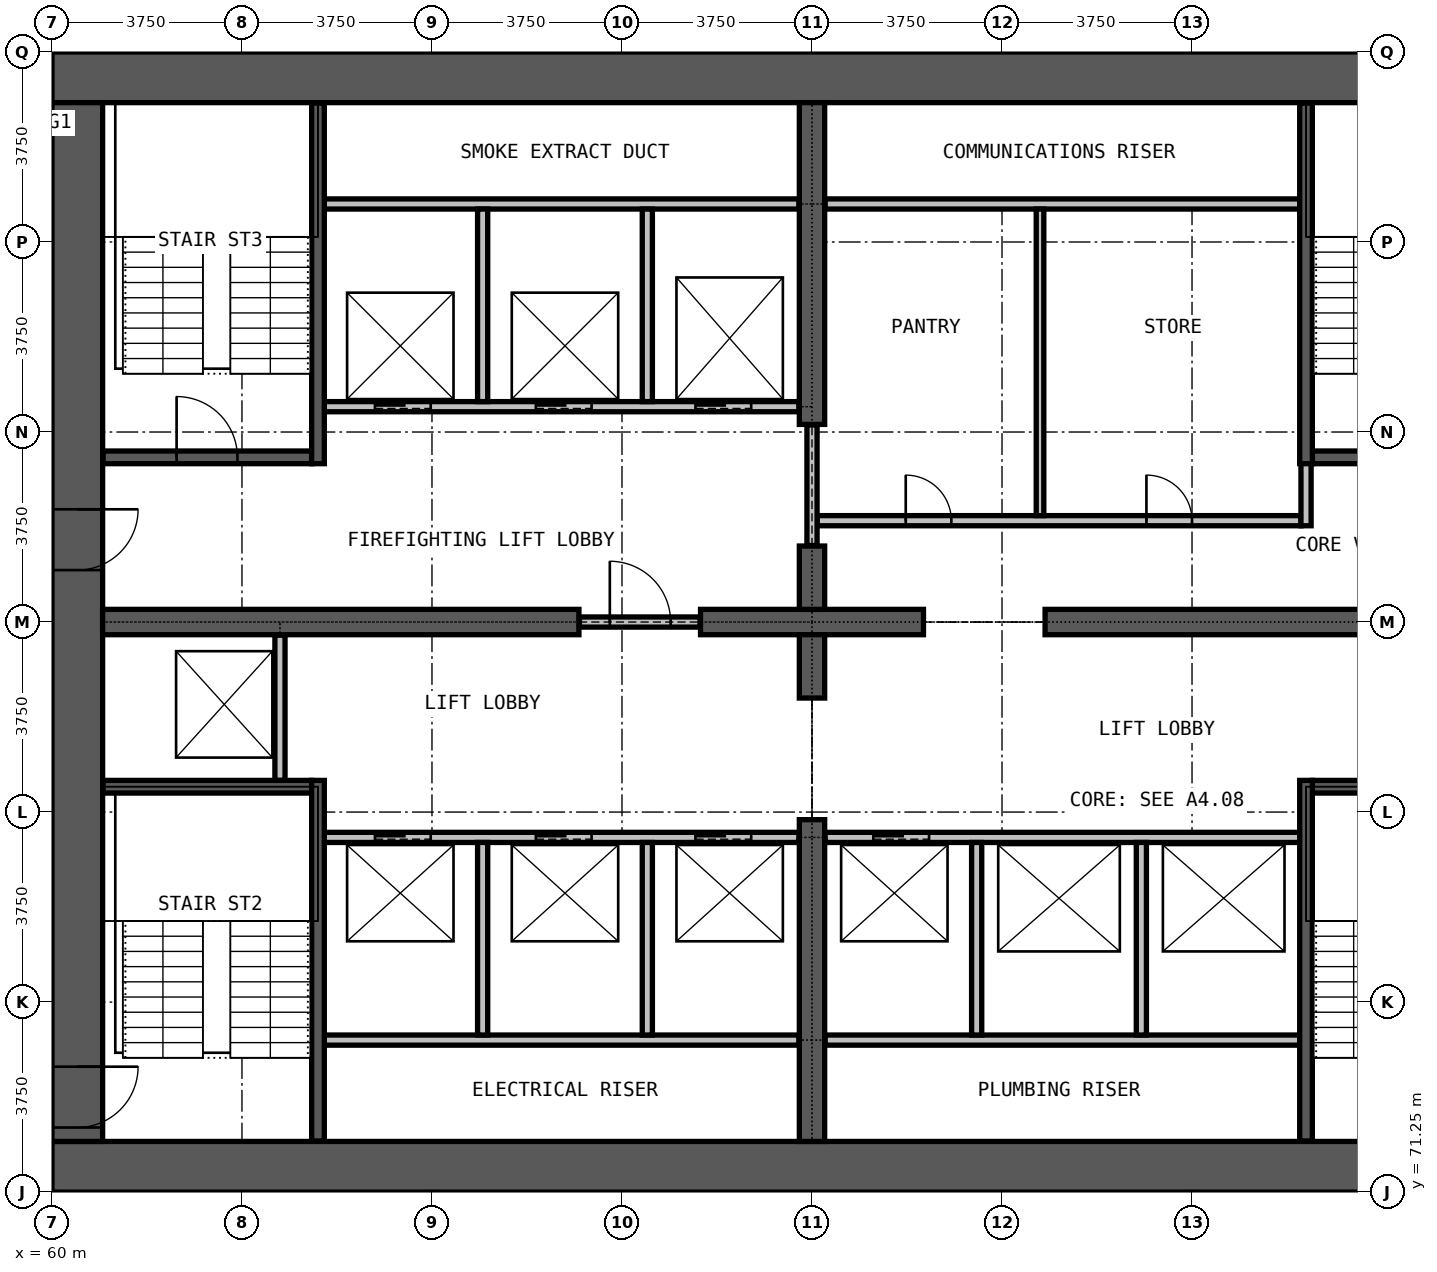
"""IFC4 building model, lengths in metres.
Left out: names, types, materials, properties, quantities, classifications, styles, units other than length and angle.
Written with IfcOpenShell. Run it as: python <this file> out.ifc"""

import sys

from ifc_helpers import new_model, si_unit, direction, frame, frame_2d, origin, place, context, subcontext, project, spatial, rectangle, extrude, element, fill, save


model = new_model("IFC4")
c1 = context("Model", 3, precision=1e-05, world=origin(), true_north=direction((0.0, 1.0)))
c2 = subcontext(c1, "Body", "Model", "MODEL_VIEW")
j1 = project(units=[si_unit("LENGTHUNIT", "METRE"), si_unit("PLANEANGLEUNIT", "RADIAN")], contexts=[c1])
p1 = place(None, origin())
s1 = spatial("IfcSite", under=j1, at=p1, CompositionType="ELEMENT")
p2 = place(p1, origin())
s2 = spatial("IfcBuilding", under=s1, at=p2, CompositionType="ELEMENT")
p3 = place(p2, frame((0.0, 0.0, 52.7)))
s3 = spatial("IfcBuildingStorey", under=s2, at=p3, CompositionType="ELEMENT", Elevation=52.7)
for number, where, z_axis, x_axis in (
    (1, (60.0, 71.75, 0.0), (0.0, 0.0, 1.0), (1.0, 0.0, 0.0)),
    (2, (90.0, 93.25, 0.0), (0.0, 0.0, 1.0), (-1.0, 0.0, 0.0)),
):
    element("IfcWall", number, at=place(p3, frame(where, z_axis=z_axis, x_axis=x_axis)), inside=s3, PredefinedType="SHEAR", context=c2, shape_type="SweptSolid", body=[
        extrude(rectangle(XDim=30.0, YDim=1.0, at=frame_2d((15.0, 0.0))), origin(), (0.0, 0.0, 1.0), 3.3),
    ])
p4 = place(p3, frame((60.5, 92.75, 0.0), z_axis=(0.0, 0.0, 1.0), x_axis=(0.0, -1.0, 0.0)))
e3 = element("IfcWall", 3, at=p4, inside=s3, PredefinedType="SHEAR", context=c2, shape_type="SweptSolid", body=[
    extrude(rectangle(XDim=20.5, YDim=1.0, at=frame_2d((10.25, 0.0))), origin(), (0.0, 0.0, 1.0), 3.3),
])
p5 = place(p4, frame((19.025, 0.0, 0.0)))
e4 = element("IfcOpeningElement", 4, at=p5, cuts=e3, PredefinedType="OPENING", context=c2, shape_type="SweptSolid", body=[
    extrude(rectangle(XDim=1.2, YDim=2.2, at=frame_2d((0.6, 1.1))), frame((0.0, 0.51, 0.0), z_axis=(0.0, -1.0, 0.0), x_axis=(1.0, 0.0, 0.0)), (0.0, 0.0, 1.0), 1.02),
])
p6 = place(p4, frame((8.025, 0.0, 0.0)))
e5 = element("IfcOpeningElement", 5, at=p6, cuts=e3, PredefinedType="OPENING", context=c2, shape_type="SweptSolid", body=[
    extrude(rectangle(XDim=1.2, YDim=2.2, at=frame_2d((0.6, 1.1))), frame((0.0, 0.51, 0.0), z_axis=(0.0, -1.0, 0.0), x_axis=(1.0, 0.0, 0.0)), (0.0, 0.0, 1.0), 1.02),
])
p7 = place(p3, frame((61.0, 82.5, 0.0), z_axis=(0.0, 0.0, 1.0), x_axis=(1.0, 0.0, 0.0)))
e6 = element("IfcWall", 6, at=p7, inside=s3, PredefinedType="SHEAR", context=c2, shape_type="SweptSolid", body=[
    extrude(rectangle(XDim=9.4, YDim=0.5, at=frame_2d((4.7, 0.0))), origin(), (0.0, 0.0, 1.0), 3.3),
])
p8 = place(p3, frame((72.8, 82.5, 0.0), z_axis=(0.0, 0.0, 1.0), x_axis=(1.0, 0.0, 0.0)))
e7 = element("IfcWall", 7, at=p8, inside=s3, PredefinedType="SHEAR", context=c2, shape_type="SweptSolid", body=[
    extrude(rectangle(XDim=4.4, YDim=0.5, at=frame_2d((2.2, 0.0))), origin(), (0.0, 0.0, 1.0), 3.3),
])
p9 = place(p3, frame((79.6, 82.5, 0.0), z_axis=(0.0, 0.0, 1.0), x_axis=(1.0, 0.0, 0.0)))
e8 = element("IfcWall", 8, at=p9, inside=s3, PredefinedType="SHEAR", context=c2, shape_type="SweptSolid", body=[
    extrude(rectangle(XDim=9.4, YDim=0.5, at=frame_2d((4.7, 0.0))), origin(), (0.0, 0.0, 1.0), 3.3),
])
p10 = place(p3, frame((75.0, 72.25, 0.0), z_axis=(0.0, 0.0, 1.0), x_axis=(0.0, 1.0, 0.0)))
e9 = element("IfcWall", 9, at=p10, inside=s3, PredefinedType="SHEAR", context=c2, shape_type="SweptSolid", body=[
    extrude(rectangle(XDim=6.35, YDim=0.5, at=frame_2d((3.175, 0.0))), origin(), (0.0, 0.0, 1.0), 3.3),
])
for number, where, z_axis, x_axis in (
    (10, (75.0, 81.0, 0.0), (0.0, 0.0, 1.0), (0.0, 1.0, 0.0)),
    (11, (75.0, 82.75, 0.0), (0.0, 0.0, 1.0), (0.0, 1.0, 0.0)),
):
    element("IfcWall", number, at=place(p3, frame(where, z_axis=z_axis, x_axis=x_axis)), inside=s3, PredefinedType="SHEAR", context=c2, shape_type="SweptSolid", body=[
        extrude(rectangle(XDim=1.25, YDim=0.5, at=frame_2d((0.625, 0.0))), origin(), (0.0, 0.0, 1.0), 3.3),
    ])
p11 = place(p3, frame((75.0, 86.4, 0.0), z_axis=(0.0, 0.0, 1.0), x_axis=(0.0, 1.0, 0.0)))
e12 = element("IfcWall", 12, at=p11, inside=s3, PredefinedType="SHEAR", context=c2, shape_type="SweptSolid", body=[
    extrude(rectangle(XDim=6.35, YDim=0.5, at=frame_2d((3.175, 0.0))), origin(), (0.0, 0.0, 1.0), 3.3),
])
p12 = place(p3, frame((70.41, 82.5, 0.0), z_axis=(0.0, 0.0, 1.0), x_axis=(1.0, 0.0, 0.0)))
e13 = element("IfcWall", 13, at=p12, inside=s3, PredefinedType="PARTITIONING", context=c2, shape_type="SweptSolid", body=[
    extrude(rectangle(XDim=2.38, YDim=0.2, at=frame_2d((1.19, 0.0))), origin(), (0.0, 0.0, 1.0), 2.4),
])
p13 = place(p12, frame((0.6, 0.0, 0.0)))
e14 = element("IfcOpeningElement", 14, at=p13, cuts=e13, PredefinedType="OPENING", context=c2, shape_type="SweptSolid", body=[
    extrude(rectangle(XDim=1.2, YDim=2.2, at=frame_2d((0.6, 1.1))), frame((0.0, 0.11, 0.0), z_axis=(0.0, -1.0, 0.0), x_axis=(1.0, 0.0, 0.0)), (0.0, 0.0, 1.0), 0.22),
])
p14 = place(p3, frame((75.1, 84.5, 0.0), z_axis=(0.0, 0.0, 1.0), x_axis=(1.0, 0.0, 0.0)))
e15 = element("IfcWall", 15, at=p14, inside=s3, PredefinedType="PARTITIONING", context=c2, shape_type="SweptSolid", body=[
    extrude(rectangle(XDim=9.55, YDim=0.2, at=frame_2d((4.775, 0.0))), origin(), (0.0, 0.0, 1.0), 3.0),
])
p15 = place(p14, frame((1.75, 0.0, 0.0)))
e16 = element("IfcOpeningElement", 16, at=p15, cuts=e15, PredefinedType="OPENING", context=c2, shape_type="SweptSolid", body=[
    extrude(rectangle(XDim=0.9, YDim=2.2, at=frame_2d((0.45, 1.1))), frame((0.0, 0.11, 0.0), z_axis=(0.0, -1.0, 0.0), x_axis=(1.0, 0.0, 0.0)), (0.0, 0.0, 1.0), 0.22),
])
p16 = place(p14, frame((6.5, 0.0, 0.0)))
e17 = element("IfcOpeningElement", 17, at=p16, cuts=e15, PredefinedType="OPENING", context=c2, shape_type="SweptSolid", body=[
    extrude(rectangle(XDim=0.9, YDim=2.2, at=frame_2d((0.45, 1.1))), frame((0.0, 0.11, 0.0), z_axis=(0.0, -1.0, 0.0), x_axis=(1.0, 0.0, 0.0)), (0.0, 0.0, 1.0), 0.22),
])
p17 = place(p3, frame((75.26, 90.75, 0.0), z_axis=(0.0, 0.0, 1.0), x_axis=(1.0, 0.0, 0.0)))
e18 = element("IfcWall", 18, at=p17, inside=s3, PredefinedType="PARTITIONING", context=c2, shape_type="SweptSolid", body=[
    extrude(rectangle(XDim=9.365, YDim=0.2, at=frame_2d((4.683, 0.0))), origin(), (0.0, 0.0, 1.0), 3.0),
])
p18 = place(p3, frame((75.0, 84.01, 0.0), z_axis=(0.0, 0.0, 1.0), x_axis=(0.0, 1.0, 0.0)))
e19 = element("IfcWall", 19, at=p18, inside=s3, PredefinedType="PARTITIONING", context=c2, shape_type="SweptSolid", body=[
    extrude(rectangle(XDim=2.38, YDim=0.2, at=frame_2d((1.19, 0.0))), origin(), (0.0, 0.0, 1.0), 2.4),
])
p19 = place(p3, frame((84.75, 84.4, 0.0), z_axis=(0.0, 0.0, 1.0), x_axis=(0.0, 1.0, 0.0)))
e20 = element("IfcWall", 20, at=p19, inside=s3, PredefinedType="PARTITIONING", context=c2, shape_type="SweptSolid", body=[
    extrude(rectangle(XDim=1.475, YDim=0.2, at=frame_2d((0.738, 0.0))), origin(), (0.0, 0.0, 1.0), 3.0),
])
p20 = place(p3, frame((79.5, 84.6, 0.0), z_axis=(0.0, 0.0, 1.0), x_axis=(0.0, 1.0, 0.0)))
e21 = element("IfcWall", 21, at=p20, inside=s3, PredefinedType="PARTITIONING", context=c2, shape_type="SweptSolid", body=[
    extrude(rectangle(XDim=6.05, YDim=0.15, at=frame_2d((3.025, 0.0))), origin(), (0.0, 0.0, 1.0), 3.0),
])
for number, where, z_axis, x_axis in (
    (22, (65.375, 74.25, 0.0), (0.0, 0.0, 1.0), (1.0, 0.0, 0.0)),
    (23, (75.26, 74.25, 0.0), (0.0, 0.0, 1.0), (1.0, 0.0, 0.0)),
):
    element("IfcWall", number, at=place(p3, frame(where, z_axis=z_axis, x_axis=x_axis)), inside=s3, PredefinedType="PARTITIONING", context=c2, shape_type="SweptSolid", body=[
        extrude(rectangle(XDim=9.365, YDim=0.2, at=frame_2d((4.683, 0.0))), origin(), (0.0, 0.0, 1.0), 3.0),
    ])
p21 = place(p3, frame((65.375, 78.25, 0.0), z_axis=(0.0, 0.0, 1.0), x_axis=(1.0, 0.0, 0.0)))
e24 = element("IfcWall", 24, at=p21, inside=s3, PredefinedType="PARTITIONING", context=c2, shape_type="SweptSolid", body=[
    extrude(rectangle(XDim=9.365, YDim=0.2, at=frame_2d((4.683, 0.0))), origin(), (0.0, 0.0, 1.0), 3.0),
])
p22 = place(p21, frame((1.0, 0.0, 0.0)))
e25 = element("IfcOpeningElement", 25, at=p22, cuts=e24, PredefinedType="OPENING", context=c2, shape_type="SweptSolid", body=[
    extrude(rectangle(XDim=1.1, YDim=2.2, at=frame_2d((0.55, 1.1))), frame((0.0, 0.11, 0.0), z_axis=(0.0, -1.0, 0.0), x_axis=(1.0, 0.0, 0.0)), (0.0, 0.0, 1.0), 0.22),
])
p23 = place(p21, frame((4.175, 0.0, 0.0)))
e26 = element("IfcOpeningElement", 26, at=p23, cuts=e24, PredefinedType="OPENING", context=c2, shape_type="SweptSolid", body=[
    extrude(rectangle(XDim=1.1, YDim=2.2, at=frame_2d((0.55, 1.1))), frame((0.0, 0.11, 0.0), z_axis=(0.0, -1.0, 0.0), x_axis=(1.0, 0.0, 0.0)), (0.0, 0.0, 1.0), 0.22),
])
p24 = place(p21, frame((7.325, 0.0, 0.0)))
e27 = element("IfcOpeningElement", 27, at=p24, cuts=e24, PredefinedType="OPENING", context=c2, shape_type="SweptSolid", body=[
    extrude(rectangle(XDim=1.1, YDim=2.2, at=frame_2d((0.55, 1.1))), frame((0.0, 0.11, 0.0), z_axis=(0.0, -1.0, 0.0), x_axis=(1.0, 0.0, 0.0)), (0.0, 0.0, 1.0), 0.22),
])
p25 = place(p3, frame((75.26, 78.25, 0.0), z_axis=(0.0, 0.0, 1.0), x_axis=(1.0, 0.0, 0.0)))
e28 = element("IfcWall", 28, at=p25, inside=s3, PredefinedType="PARTITIONING", context=c2, shape_type="SweptSolid", body=[
    extrude(rectangle(XDim=9.365, YDim=0.2, at=frame_2d((4.683, 0.0))), origin(), (0.0, 0.0, 1.0), 3.0),
])
p26 = place(p25, frame((0.95, 0.0, 0.0)))
e29 = element("IfcOpeningElement", 29, at=p26, cuts=e28, PredefinedType="OPENING", context=c2, shape_type="SweptSolid", body=[
    extrude(rectangle(XDim=1.1, YDim=2.2, at=frame_2d((0.55, 1.1))), frame((0.0, 0.11, 0.0), z_axis=(0.0, -1.0, 0.0), x_axis=(1.0, 0.0, 0.0)), (0.0, 0.0, 1.0), 0.22),
])
p27 = place(p3, frame((65.375, 86.75, 0.0), z_axis=(0.0, 0.0, 1.0), x_axis=(1.0, 0.0, 0.0)))
e30 = element("IfcWall", 30, at=p27, inside=s3, PredefinedType="PARTITIONING", context=c2, shape_type="SweptSolid", body=[
    extrude(rectangle(XDim=9.365, YDim=0.2, at=frame_2d((4.683, 0.0))), origin(), (0.0, 0.0, 1.0), 3.0),
])
p28 = place(p27, frame((1.0, 0.0, 0.0)))
e31 = element("IfcOpeningElement", 31, at=p28, cuts=e30, PredefinedType="OPENING", context=c2, shape_type="SweptSolid", body=[
    extrude(rectangle(XDim=1.1, YDim=2.2, at=frame_2d((0.55, 1.1))), frame((0.0, 0.11, 0.0), z_axis=(0.0, -1.0, 0.0), x_axis=(1.0, 0.0, 0.0)), (0.0, 0.0, 1.0), 0.22),
])
p29 = place(p27, frame((4.175, 0.0, 0.0)))
e32 = element("IfcOpeningElement", 32, at=p29, cuts=e30, PredefinedType="OPENING", context=c2, shape_type="SweptSolid", body=[
    extrude(rectangle(XDim=1.1, YDim=2.2, at=frame_2d((0.55, 1.1))), frame((0.0, 0.11, 0.0), z_axis=(0.0, -1.0, 0.0), x_axis=(1.0, 0.0, 0.0)), (0.0, 0.0, 1.0), 0.22),
])
p30 = place(p27, frame((7.325, 0.0, 0.0)))
e33 = element("IfcOpeningElement", 33, at=p30, cuts=e30, PredefinedType="OPENING", context=c2, shape_type="SweptSolid", body=[
    extrude(rectangle(XDim=1.1, YDim=2.2, at=frame_2d((0.55, 1.1))), frame((0.0, 0.11, 0.0), z_axis=(0.0, -1.0, 0.0), x_axis=(1.0, 0.0, 0.0)), (0.0, 0.0, 1.0), 0.22),
])
p31 = place(p3, frame((65.375, 90.75, 0.0), z_axis=(0.0, 0.0, 1.0), x_axis=(1.0, 0.0, 0.0)))
e34 = element("IfcWall", 34, at=p31, inside=s3, PredefinedType="PARTITIONING", context=c2, shape_type="SweptSolid", body=[
    extrude(rectangle(XDim=9.365, YDim=0.2, at=frame_2d((4.683, 0.0))), origin(), (0.0, 0.0, 1.0), 3.0),
])
p32 = place(p3, frame((64.5, 79.375, 0.0), z_axis=(0.0, 0.0, 1.0), x_axis=(0.0, 1.0, 0.0)))
e35 = element("IfcWall", 35, at=p32, inside=s3, PredefinedType="PARTITIONING", context=c2, shape_type="SweptSolid", body=[
    extrude(rectangle(XDim=2.865, YDim=0.2, at=frame_2d((1.433, 0.0))), origin(), (0.0, 0.0, 1.0), 3.0),
])
for number, where, z_axis, x_axis in (
    (36, (68.5, 74.35, 0.0), (0.0, 0.0, 1.0), (0.0, 1.0, 0.0)),
    (37, (68.5, 86.85, 0.0), (0.0, 0.0, 1.0), (0.0, 1.0, 0.0)),
    (38, (71.75, 74.35, 0.0), (0.0, 0.0, 1.0), (0.0, 1.0, 0.0)),
    (39, (71.75, 86.85, 0.0), (0.0, 0.0, 1.0), (0.0, 1.0, 0.0)),
    (40, (78.25, 74.35, 0.0), (0.0, 0.0, 1.0), (0.0, 1.0, 0.0)),
    (41, (81.5, 74.35, 0.0), (0.0, 0.0, 1.0), (0.0, 1.0, 0.0)),
):
    element("IfcWall", number, at=place(p3, frame(where, z_axis=z_axis, x_axis=x_axis)), inside=s3, PredefinedType="PARTITIONING", context=c2, shape_type="SweptSolid", body=[
        extrude(rectangle(XDim=3.8, YDim=0.2, at=frame_2d((1.9, 0.0))), origin(), (0.0, 0.0, 1.0), 3.0),
    ])
for number, where, z_axis, x_axis in (
    (42, (61.01, 79.25, 0.0), (0.0, 0.0, 1.0), (1.0, 0.0, 0.0)),
    (43, (84.875, 79.25, 0.0), (0.0, 0.0, 1.0), (1.0, 0.0, 0.0)),
):
    element("IfcWall", number, at=place(p3, frame(where, z_axis=z_axis, x_axis=x_axis)), inside=s3, PredefinedType="PARTITIONING", context=c2, shape_type="SweptSolid", body=[
        extrude(rectangle(XDim=4.115, YDim=0.25, at=frame_2d((2.058, 0.0))), origin(), (0.0, 0.0, 1.0), 3.0),
    ])
p33 = place(p3, frame((61.01, 85.75, 0.0), z_axis=(0.0, 0.0, 1.0), x_axis=(1.0, 0.0, 0.0)))
e44 = element("IfcWall", 44, at=p33, inside=s3, PredefinedType="PARTITIONING", context=c2, shape_type="SweptSolid", body=[
    extrude(rectangle(XDim=4.115, YDim=0.25, at=frame_2d((2.058, 0.0))), origin(), (0.0, 0.0, 1.0), 3.0),
])
p34 = place(p33, frame((1.45, 0.0, 0.0)))
e45 = element("IfcOpeningElement", 45, at=p34, cuts=e44, PredefinedType="OPENING", context=c2, shape_type="SweptSolid", body=[
    extrude(rectangle(XDim=1.2, YDim=2.2, at=frame_2d((0.6, 1.1))), frame((0.0, 0.135, 0.0), z_axis=(0.0, -1.0, 0.0), x_axis=(1.0, 0.0, 0.0)), (0.0, 0.0, 1.0), 0.27),
])
p35 = place(p3, frame((84.875, 85.75, 0.0), z_axis=(0.0, 0.0, 1.0), x_axis=(1.0, 0.0, 0.0)))
e46 = element("IfcWall", 46, at=p35, inside=s3, PredefinedType="PARTITIONING", context=c2, shape_type="SweptSolid", body=[
    extrude(rectangle(XDim=4.115, YDim=0.25, at=frame_2d((2.058, 0.0))), origin(), (0.0, 0.0, 1.0), 3.0),
])
for number, where, z_axis, x_axis in (
    (47, (65.25, 72.26, 0.0), (0.0, 0.0, 1.0), (0.0, 1.0, 0.0)),
    (48, (65.25, 85.625, 0.0), (0.0, 0.0, 1.0), (0.0, 1.0, 0.0)),
    (49, (84.75, 72.26, 0.0), (0.0, 0.0, 1.0), (0.0, 1.0, 0.0)),
    (50, (84.75, 85.625, 0.0), (0.0, 0.0, 1.0), (0.0, 1.0, 0.0)),
):
    element("IfcWall", number, at=place(p3, frame(where, z_axis=z_axis, x_axis=x_axis)), inside=s3, PredefinedType="PARTITIONING", context=c2, shape_type="SweptSolid", body=[
        extrude(rectangle(XDim=7.115, YDim=0.25, at=frame_2d((3.558, 0.0))), origin(), (0.0, 0.0, 1.0), 3.0),
    ])
p36 = place(p22, origin())
e51 = element("IfcDoor", 51, at=p36, inside=s3, OperationType="DOUBLE_DOOR_SLIDING", PredefinedType="DOOR", context=c2, shape_type="SweptSolid", body=[
    extrude(rectangle(XDim=1.1, YDim=2.2, at=frame_2d((0.55, 1.1))), frame((0.0, 0.025, 0.0), z_axis=(0.0, -1.0, 0.0), x_axis=(1.0, 0.0, 0.0)), (0.0, 0.0, 1.0), 0.05),
])
fill(e25, e51)
p37 = place(p23, origin())
e52 = element("IfcDoor", 52, at=p37, inside=s3, OperationType="DOUBLE_DOOR_SLIDING", PredefinedType="DOOR", context=c2, shape_type="SweptSolid", body=[
    extrude(rectangle(XDim=1.1, YDim=2.2, at=frame_2d((0.55, 1.1))), frame((0.0, 0.025, 0.0), z_axis=(0.0, -1.0, 0.0), x_axis=(1.0, 0.0, 0.0)), (0.0, 0.0, 1.0), 0.05),
])
fill(e26, e52)
p38 = place(p24, origin())
e53 = element("IfcDoor", 53, at=p38, inside=s3, OperationType="DOUBLE_DOOR_SLIDING", PredefinedType="DOOR", context=c2, shape_type="SweptSolid", body=[
    extrude(rectangle(XDim=1.1, YDim=2.2, at=frame_2d((0.55, 1.1))), frame((0.0, 0.025, 0.0), z_axis=(0.0, -1.0, 0.0), x_axis=(1.0, 0.0, 0.0)), (0.0, 0.0, 1.0), 0.05),
])
fill(e27, e53)
p39 = place(p26, origin())
e54 = element("IfcDoor", 54, at=p39, inside=s3, OperationType="DOUBLE_DOOR_SLIDING", PredefinedType="DOOR", context=c2, shape_type="SweptSolid", body=[
    extrude(rectangle(XDim=1.1, YDim=2.2, at=frame_2d((0.55, 1.1))), frame((0.0, 0.025, 0.0), z_axis=(0.0, -1.0, 0.0), x_axis=(1.0, 0.0, 0.0)), (0.0, 0.0, 1.0), 0.05),
])
fill(e29, e54)
p40 = place(p28, origin())
e55 = element("IfcDoor", 55, at=p40, inside=s3, OperationType="DOUBLE_DOOR_SLIDING", PredefinedType="DOOR", context=c2, shape_type="SweptSolid", body=[
    extrude(rectangle(XDim=1.1, YDim=2.2, at=frame_2d((0.55, 1.1))), frame((0.0, 0.025, 0.0), z_axis=(0.0, -1.0, 0.0), x_axis=(1.0, 0.0, 0.0)), (0.0, 0.0, 1.0), 0.05),
])
fill(e31, e55)
p41 = place(p29, origin())
e56 = element("IfcDoor", 56, at=p41, inside=s3, OperationType="DOUBLE_DOOR_SLIDING", PredefinedType="DOOR", context=c2, shape_type="SweptSolid", body=[
    extrude(rectangle(XDim=1.1, YDim=2.2, at=frame_2d((0.55, 1.1))), frame((0.0, 0.025, 0.0), z_axis=(0.0, -1.0, 0.0), x_axis=(1.0, 0.0, 0.0)), (0.0, 0.0, 1.0), 0.05),
])
fill(e32, e56)
p42 = place(p30, origin())
e57 = element("IfcDoor", 57, at=p42, inside=s3, OperationType="DOUBLE_DOOR_SLIDING", PredefinedType="DOOR", context=c2, shape_type="SweptSolid", body=[
    extrude(rectangle(XDim=1.1, YDim=2.2, at=frame_2d((0.55, 1.1))), frame((0.0, 0.025, 0.0), z_axis=(0.0, -1.0, 0.0), x_axis=(1.0, 0.0, 0.0)), (0.0, 0.0, 1.0), 0.05),
])
fill(e33, e57)
p43 = place(p13, origin())
e58 = element("IfcDoor", 58, at=p43, inside=s3, OperationType="SINGLE_SWING_LEFT", PredefinedType="DOOR", context=c2, shape_type="SweptSolid", body=[
    extrude(rectangle(XDim=1.2, YDim=2.2, at=frame_2d((0.6, 1.1))), frame((0.0, 0.025, 0.0), z_axis=(0.0, -1.0, 0.0), x_axis=(1.0, 0.0, 0.0)), (0.0, 0.0, 1.0), 0.05),
])
fill(e14, e58)
p44 = place(p34, origin())
e59 = element("IfcDoor", 59, at=p44, inside=s3, OperationType="SINGLE_SWING_RIGHT", PredefinedType="DOOR", context=c2, shape_type="SweptSolid", body=[
    extrude(rectangle(XDim=1.2, YDim=2.2, at=frame_2d((0.6, 1.1))), frame((0.0, 0.025, 0.0), z_axis=(0.0, -1.0, 0.0), x_axis=(1.0, 0.0, 0.0)), (0.0, 0.0, 1.0), 0.05),
])
fill(e45, e59)
p45 = place(p5, origin())
e60 = element("IfcDoor", 60, at=p45, inside=s3, OperationType="SINGLE_SWING_LEFT", PredefinedType="DOOR", context=c2, shape_type="SweptSolid", body=[
    extrude(rectangle(XDim=1.2, YDim=2.2, at=frame_2d((0.6, 1.1))), frame((0.0, 0.025, 0.0), z_axis=(0.0, -1.0, 0.0), x_axis=(1.0, 0.0, 0.0)), (0.0, 0.0, 1.0), 0.05),
])
fill(e4, e60)
p46 = place(p6, origin())
e61 = element("IfcDoor", 61, at=p46, inside=s3, OperationType="SINGLE_SWING_RIGHT", PredefinedType="DOOR", context=c2, shape_type="SweptSolid", body=[
    extrude(rectangle(XDim=1.2, YDim=2.2, at=frame_2d((0.6, 1.1))), frame((0.0, 0.025, 0.0), z_axis=(0.0, -1.0, 0.0), x_axis=(1.0, 0.0, 0.0)), (0.0, 0.0, 1.0), 0.05),
])
fill(e5, e61)
p47 = place(p15, origin())
e62 = element("IfcDoor", 62, at=p47, inside=s3, OperationType="SINGLE_SWING_LEFT", PredefinedType="DOOR", context=c2, shape_type="SweptSolid", body=[
    extrude(rectangle(XDim=0.9, YDim=2.2, at=frame_2d((0.45, 1.1))), frame((0.0, 0.025, 0.0), z_axis=(0.0, -1.0, 0.0), x_axis=(1.0, 0.0, 0.0)), (0.0, 0.0, 1.0), 0.05),
])
fill(e16, e62)
p48 = place(p16, origin())
e63 = element("IfcDoor", 63, at=p48, inside=s3, OperationType="SINGLE_SWING_RIGHT", PredefinedType="DOOR", context=c2, shape_type="SweptSolid", body=[
    extrude(rectangle(XDim=0.9, YDim=2.2, at=frame_2d((0.45, 1.1))), frame((0.0, 0.025, 0.0), z_axis=(0.0, -1.0, 0.0), x_axis=(1.0, 0.0, 0.0)), (0.0, 0.0, 1.0), 0.05),
])
fill(e17, e63)
save(model, sys.argv[1])
